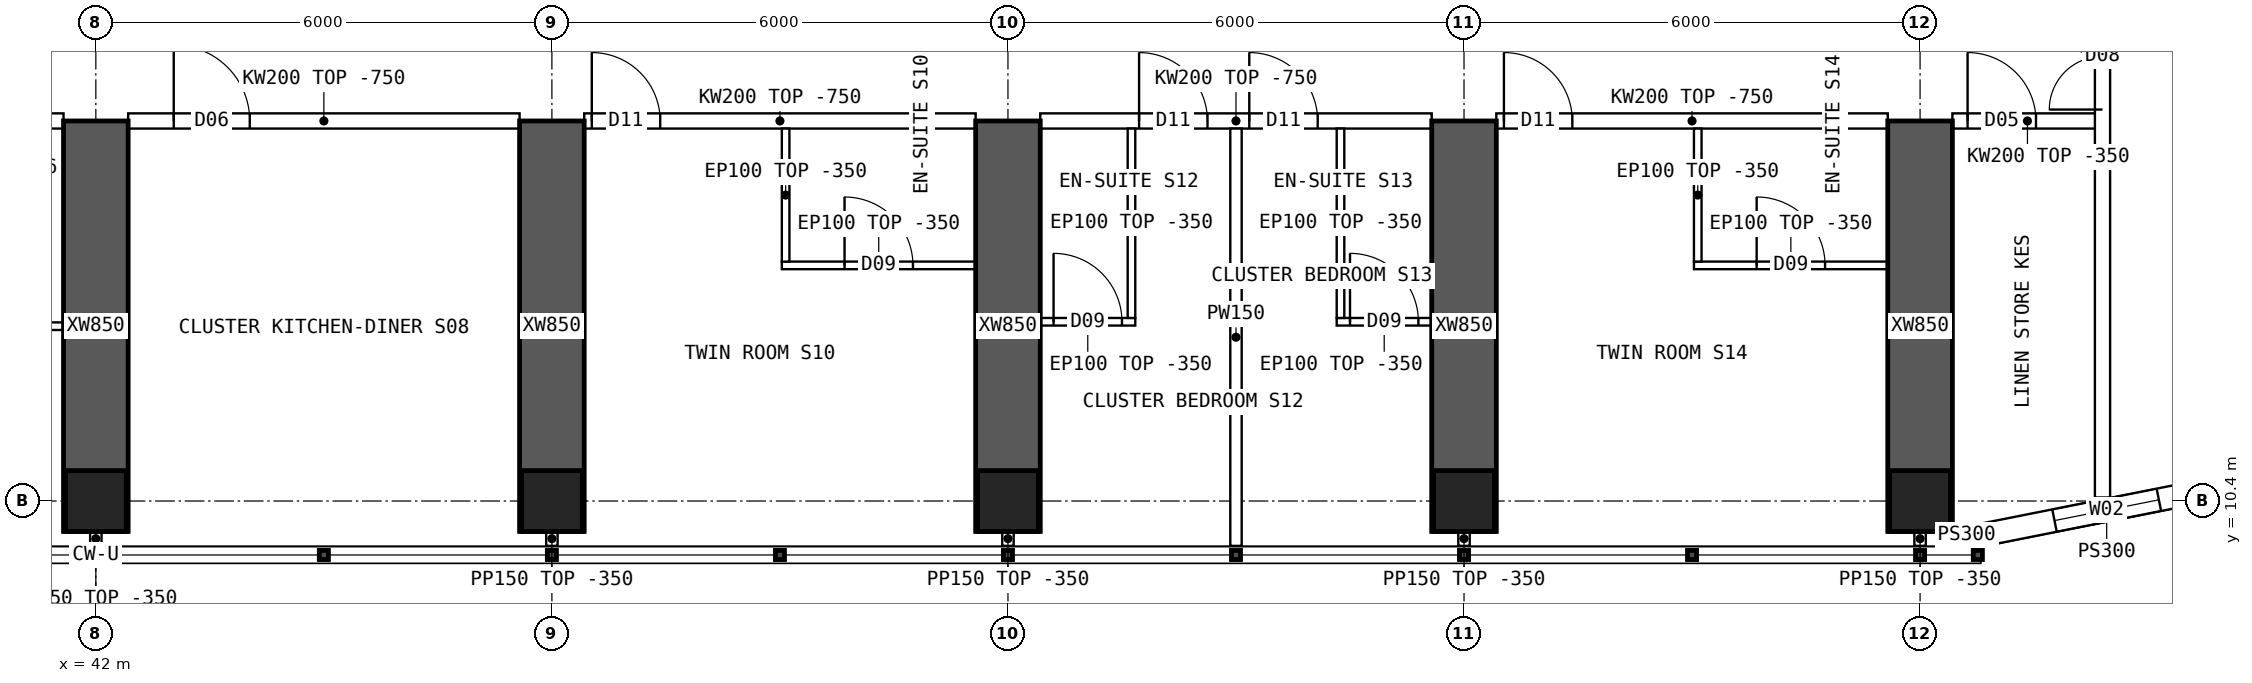
"""IFC4 building model, lengths in metres.
Left out: names, types, materials, properties, quantities, classifications, styles, units other than length and angle.
Written with IfcOpenShell. Run it as: python <this file> out.ifc"""

import sys

from ifc_helpers import new_model, si_unit, direction, frame, frame_2d, origin, origin_2d, place, context, subcontext, project, spatial, polyline, rectangle, hollow_rectangle, outline, extrude, element, fill, save


model = new_model("IFC4")
c1 = context("Model", 3, precision=1e-05, world=origin(), true_north=direction((0.0, 1.0)))
c2 = subcontext(c1, "Body", "Model", "MODEL_VIEW")
j1 = project(units=[si_unit("LENGTHUNIT", "METRE"), si_unit("PLANEANGLEUNIT", "RADIAN")], contexts=[c1])
p1 = place(None, origin())
s1 = spatial("IfcSite", under=j1, at=p1, CompositionType="ELEMENT")
p2 = place(p1, origin())
s2 = spatial("IfcBuilding", under=s1, at=p2, CompositionType="ELEMENT")
p3 = place(p2, frame((0.0, 0.0, 197.35)))
s3 = spatial("IfcBuildingStorey", under=s2, at=p3, CompositionType="ELEMENT", Elevation=197.35)
for number, where, z_axis, x_axis in (
    (1, (42.0, 10.4, 0.0), (0.0, 0.0, 1.0), (1.0, 0.0, 0.0)),
    (2, (48.0, 10.4, 0.0), (0.0, 0.0, 1.0), (1.0, 0.0, 0.0)),
    (3, (54.0, 10.4, 0.0), (0.0, 0.0, 1.0), (1.0, 0.0, 0.0)),
    (4, (60.0, 10.4, 0.0), (0.0, 0.0, 1.0), (1.0, 0.0, 0.0)),
    (5, (66.0, 10.4, 0.0), (0.0, 0.0, 1.0), (1.0, 0.0, 0.0)),
):
    element("IfcColumn", number, at=place(p3, frame(where, z_axis=z_axis, x_axis=x_axis)), inside=s3, PredefinedType="COLUMN", context=c2, shape_type="SweptSolid", body=[
        extrude(hollow_rectangle(XDim=0.8, YDim=0.8, WallThickness=0.08, at=origin_2d()), origin(), (0.0, 0.0, 1.0), 3.75),
    ])
for number, where, z_axis, x_axis in (
    (6, (42.0, 10.0, 0.0), (0.0, 0.0, 1.0), (0.0, 1.0, 0.0)),
    (7, (48.0, 10.0, 0.0), (0.0, 0.0, 1.0), (0.0, 1.0, 0.0)),
    (8, (54.0, 10.0, 0.0), (0.0, 0.0, 1.0), (0.0, 1.0, 0.0)),
    (9, (60.0, 10.0, 0.0), (0.0, 0.0, 1.0), (0.0, 1.0, 0.0)),
    (10, (66.0, 10.0, 0.0), (0.0, 0.0, 1.0), (0.0, 1.0, 0.0)),
):
    element("IfcWall", number, at=place(p3, frame(where, z_axis=z_axis, x_axis=x_axis)), inside=s3, PredefinedType="SHEAR", context=c2, shape_type="SweptSolid", body=[
        extrude(rectangle(XDim=5.4, YDim=0.85, at=frame_2d((2.7, 0.0))), origin(), (0.0, 0.0, 1.0), 3.75),
    ])
p4 = place(p3, frame((66.8, 9.95, 0.0), z_axis=(0.0, 0.0, 1.0), x_axis=(0.98078325777, 0.195100490205, 0.0)))
e11 = element("IfcWall", 11, at=p4, inside=s3, PredefinedType="SOLIDWALL", context=c2, shape_type="SweptSolid", body=[
    extrude(outline(polyline([(-0.03, -0.15), (3.405, -0.15), (3.345, 0.15), (0.03, 0.15), (-0.03, -0.15)])), origin(), (0.0, 0.0, 1.0), 3.4),
])
p5 = place(p4, frame((0.988, 0.0, 0.9)))
e12 = element("IfcOpeningElement", 12, at=p5, cuts=e11, PredefinedType="OPENING", context=c2, shape_type="SweptSolid", body=[
    extrude(rectangle(XDim=1.4, YDim=1.8, at=frame_2d((0.7, 0.9))), frame((0.0, 0.16, 0.0), z_axis=(0.0, -1.0, 0.0), x_axis=(1.0, 0.0, 0.0)), (0.0, 0.0, 1.0), 0.32),
])
p6 = place(p3, frame((66.8, 9.95, 0.0), z_axis=(0.0, 0.0, 1.0), x_axis=(-1.0, 0.0, 0.0)))
e13 = element("IfcWall", 13, at=p6, inside=s3, PredefinedType="SOLIDWALL", context=c2, shape_type="SweptSolid", body=[
    extrude(rectangle(XDim=0.375, YDim=0.3, at=frame_2d((0.188, 0.0))), origin(), (0.0, 0.0, 1.0), 3.4),
])
p7 = place(p3, frame((36.425, 15.4, 0.0), z_axis=(0.0, 0.0, 1.0), x_axis=(1.0, 0.0, 0.0)))
e14 = element("IfcWall", 14, at=p7, inside=s3, PredefinedType="SOLIDWALL", context=c2, shape_type="SweptSolid", body=[
    extrude(outline(polyline([(0.0, 0.0), (5.15, 0.0), (5.15, 3.0), (0.0, 3.0), (0.0, 0.0)])), frame((0.0, 0.1, 0.0), z_axis=(0.0, -1.0, 0.0), x_axis=(1.0, 0.0, 0.0)), (0.0, 0.0, 1.0), 0.2),
])
p8 = place(p7, frame((0.3, 0.0, 0.0)))
e15 = element("IfcOpeningElement", 15, at=p8, cuts=e14, PredefinedType="OPENING", context=c2, shape_type="SweptSolid", body=[
    extrude(rectangle(XDim=1.0, YDim=2.1, at=frame_2d((0.5, 1.05))), frame((0.0, 0.11, 0.0), z_axis=(0.0, -1.0, 0.0), x_axis=(1.0, 0.0, 0.0)), (0.0, 0.0, 1.0), 0.22),
])
p9 = place(p3, frame((42.425, 15.4, 0.0), z_axis=(0.0, 0.0, 1.0), x_axis=(1.0, 0.0, 0.0)))
e16 = element("IfcWall", 16, at=p9, inside=s3, PredefinedType="SOLIDWALL", context=c2, shape_type="SweptSolid", body=[
    extrude(outline(polyline([(0.0, 0.0), (5.15, 0.0), (5.15, 3.0), (0.0, 3.0), (0.0, 0.0)])), frame((0.0, 0.1, 0.0), z_axis=(0.0, -1.0, 0.0), x_axis=(1.0, 0.0, 0.0)), (0.0, 0.0, 1.0), 0.2),
])
p10 = place(p9, frame((0.6, 0.0, 0.0)))
e17 = element("IfcOpeningElement", 17, at=p10, cuts=e16, PredefinedType="OPENING", context=c2, shape_type="SweptSolid", body=[
    extrude(rectangle(XDim=1.0, YDim=2.1, at=frame_2d((0.5, 1.05))), frame((0.0, 0.11, 0.0), z_axis=(0.0, -1.0, 0.0), x_axis=(1.0, 0.0, 0.0)), (0.0, 0.0, 1.0), 0.22),
])
p11 = place(p3, frame((48.425, 15.4, 0.0), z_axis=(0.0, 0.0, 1.0), x_axis=(1.0, 0.0, 0.0)))
e18 = element("IfcWall", 18, at=p11, inside=s3, PredefinedType="SOLIDWALL", context=c2, shape_type="SweptSolid", body=[
    extrude(outline(polyline([(0.0, 0.0), (5.15, 0.0), (5.15, 3.0), (0.0, 3.0), (0.0, 0.0)])), frame((0.0, 0.1, 0.0), z_axis=(0.0, -1.0, 0.0), x_axis=(1.0, 0.0, 0.0)), (0.0, 0.0, 1.0), 0.2),
])
p12 = place(p11, frame((0.1, 0.0, 0.0)))
e19 = element("IfcOpeningElement", 19, at=p12, cuts=e18, PredefinedType="OPENING", context=c2, shape_type="SweptSolid", body=[
    extrude(rectangle(XDim=0.9, YDim=2.1, at=frame_2d((0.45, 1.05))), frame((0.0, 0.11, 0.0), z_axis=(0.0, -1.0, 0.0), x_axis=(1.0, 0.0, 0.0)), (0.0, 0.0, 1.0), 0.22),
])
p13 = place(p3, frame((54.425, 15.4, 0.0), z_axis=(0.0, 0.0, 1.0), x_axis=(1.0, 0.0, 0.0)))
e20 = element("IfcWall", 20, at=p13, inside=s3, PredefinedType="SOLIDWALL", context=c2, shape_type="SweptSolid", body=[
    extrude(outline(polyline([(0.0, 0.0), (5.15, 0.0), (5.15, 3.0), (0.0, 3.0), (0.0, 0.0)])), frame((0.0, 0.1, 0.0), z_axis=(0.0, -1.0, 0.0), x_axis=(1.0, 0.0, 0.0)), (0.0, 0.0, 1.0), 0.2),
])
p14 = place(p13, frame((1.3, 0.0, 0.0)))
e21 = element("IfcOpeningElement", 21, at=p14, cuts=e20, PredefinedType="OPENING", context=c2, shape_type="SweptSolid", body=[
    extrude(rectangle(XDim=0.9, YDim=2.1, at=frame_2d((0.45, 1.05))), frame((0.0, 0.11, 0.0), z_axis=(0.0, -1.0, 0.0), x_axis=(1.0, 0.0, 0.0)), (0.0, 0.0, 1.0), 0.22),
])
p15 = place(p13, frame((2.75, 0.0, 0.0)))
e22 = element("IfcOpeningElement", 22, at=p15, cuts=e20, PredefinedType="OPENING", context=c2, shape_type="SweptSolid", body=[
    extrude(rectangle(XDim=0.9, YDim=2.1, at=frame_2d((0.45, 1.05))), frame((0.0, 0.11, 0.0), z_axis=(0.0, -1.0, 0.0), x_axis=(1.0, 0.0, 0.0)), (0.0, 0.0, 1.0), 0.22),
])
p16 = place(p3, frame((60.425, 15.4, 0.0), z_axis=(0.0, 0.0, 1.0), x_axis=(1.0, 0.0, 0.0)))
e23 = element("IfcWall", 23, at=p16, inside=s3, PredefinedType="SOLIDWALL", context=c2, shape_type="SweptSolid", body=[
    extrude(outline(polyline([(0.0, 0.0), (5.15, 0.0), (5.15, 3.0), (0.0, 3.0), (0.0, 0.0)])), frame((0.0, 0.1, 0.0), z_axis=(0.0, -1.0, 0.0), x_axis=(1.0, 0.0, 0.0)), (0.0, 0.0, 1.0), 0.2),
])
p17 = place(p16, frame((0.1, 0.0, 0.0)))
e24 = element("IfcOpeningElement", 24, at=p17, cuts=e23, PredefinedType="OPENING", context=c2, shape_type="SweptSolid", body=[
    extrude(rectangle(XDim=0.9, YDim=2.1, at=frame_2d((0.45, 1.05))), frame((0.0, 0.11, 0.0), z_axis=(0.0, -1.0, 0.0), x_axis=(1.0, 0.0, 0.0)), (0.0, 0.0, 1.0), 0.22),
])
p18 = place(p3, frame((66.425, 15.4, 0.0), z_axis=(0.0, 0.0, 1.0), x_axis=(1.0, 0.0, 0.0)))
e25 = element("IfcWall", 25, at=p18, inside=s3, PredefinedType="SOLIDWALL", context=c2, shape_type="SweptSolid", body=[
    extrude(rectangle(XDim=1.975, YDim=0.2, at=frame_2d((0.987, 0.0))), origin(), (0.0, 0.0, 1.0), 3.4),
])
p19 = place(p18, frame((0.2, 0.0, 0.0)))
e26 = element("IfcOpeningElement", 26, at=p19, cuts=e25, PredefinedType="OPENING", context=c2, shape_type="SweptSolid", body=[
    extrude(rectangle(XDim=0.9, YDim=2.1, at=frame_2d((0.45, 1.05))), frame((0.0, 0.11, 0.0), z_axis=(0.0, -1.0, 0.0), x_axis=(1.0, 0.0, 0.0)), (0.0, 0.0, 1.0), 0.22),
])
p20 = place(p3, frame((38.925, 12.7, 0.0), z_axis=(0.0, 0.0, 1.0), x_axis=(1.0, 0.0, 0.0)))
e27 = element("IfcWall", 27, at=p20, inside=s3, PredefinedType="PARTITIONING", context=c2, shape_type="SweptSolid", body=[
    extrude(rectangle(XDim=2.65, YDim=0.1, at=frame_2d((1.325, 0.0))), origin(), (0.0, 0.0, 1.0), 3.4),
])
p21 = place(p3, frame((53.575, 13.5, 0.0), z_axis=(0.0, 0.0, 1.0), x_axis=(-1.0, 0.0, 0.0)))
e28 = element("IfcWall", 28, at=p21, inside=s3, PredefinedType="PARTITIONING", context=c2, shape_type="SweptSolid", body=[
    extrude(rectangle(XDim=2.55, YDim=0.1, at=frame_2d((1.275, 0.0))), origin(), (0.0, 0.0, 1.0), 3.4),
])
p22 = place(p21, frame((0.825, 0.0, 0.0)))
e29 = element("IfcOpeningElement", 29, at=p22, cuts=e28, PredefinedType="OPENING", context=c2, shape_type="SweptSolid", body=[
    extrude(rectangle(XDim=0.9, YDim=2.1, at=frame_2d((0.45, 1.05))), frame((0.0, 0.06, 0.0), z_axis=(0.0, -1.0, 0.0), x_axis=(1.0, 0.0, 0.0)), (0.0, 0.0, 1.0), 0.12),
])
p23 = place(p3, frame((51.075, 13.55, 0.0), z_axis=(0.0, 0.0, 1.0), x_axis=(0.0, 1.0, 0.0)))
e30 = element("IfcWall", 30, at=p23, inside=s3, PredefinedType="PARTITIONING", context=c2, shape_type="SweptSolid", body=[
    extrude(outline(polyline([(0.0, 0.0), (1.75, 0.0), (1.75, 3.0), (1.702, 3.0), (1.7, 3.4), (0.0, 3.4), (0.0, 0.0)])), frame((0.0, 0.05, 0.0), z_axis=(0.0, -1.0, 0.0), x_axis=(1.0, 0.0, 0.0)), (0.0, 0.0, 1.0), 0.1),
])
p24 = place(p3, frame((57.0, 9.81, 0.0), z_axis=(0.0, 0.0, 1.0), x_axis=(0.0, 1.0, 0.0)))
e31 = element("IfcWall", 31, at=p24, inside=s3, PredefinedType="PARTITIONING", context=c2, shape_type="SweptSolid", body=[
    extrude(outline(polyline([(0.0, 0.0), (5.49, 0.0), (5.49, 3.0), (5.442, 3.0), (5.44, 3.4), (0.792, 3.4), (0.79, 3.0), (0.392, 3.0), (0.39, 3.4), (0.0, 3.4), (0.0, 0.0)])), frame((0.0, 0.075, 0.0), z_axis=(0.0, -1.0, 0.0), x_axis=(1.0, 0.0, 0.0)), (0.0, 0.0, 1.0), 0.15),
])
p25 = place(p3, frame((55.675, 12.758, 0.0), z_axis=(0.0, 0.0, 1.0), x_axis=(-1.0, 0.0, 0.0)))
e32 = element("IfcWall", 32, at=p25, inside=s3, PredefinedType="PARTITIONING", context=c2, shape_type="SweptSolid", body=[
    extrude(rectangle(XDim=1.25, YDim=0.1, at=frame_2d((0.625, 0.0))), origin(), (0.0, 0.0, 1.0), 3.4),
])
p26 = place(p25, frame((0.175, 0.0, 0.0)))
e33 = element("IfcOpeningElement", 33, at=p26, cuts=e32, PredefinedType="OPENING", context=c2, shape_type="SweptSolid", body=[
    extrude(rectangle(XDim=0.9, YDim=2.1, at=frame_2d((0.45, 1.05))), frame((0.0, 0.06, 0.0), z_axis=(0.0, -1.0, 0.0), x_axis=(1.0, 0.0, 0.0)), (0.0, 0.0, 1.0), 0.12),
])
p27 = place(p3, frame((55.625, 12.808, 0.0), z_axis=(0.0, 0.0, 1.0), x_axis=(0.0, 1.0, 0.0)))
e34 = element("IfcWall", 34, at=p27, inside=s3, PredefinedType="PARTITIONING", context=c2, shape_type="SweptSolid", body=[
    extrude(outline(polyline([(0.0, 0.0), (2.492, 0.0), (2.492, 3.0), (2.444, 3.0), (2.442, 3.4), (0.0, 3.4), (0.0, 0.0)])), frame((0.0, 0.05, 0.0), z_axis=(0.0, -1.0, 0.0), x_axis=(1.0, 0.0, 0.0)), (0.0, 0.0, 1.0), 0.1),
])
p28 = place(p3, frame((59.575, 12.758, 0.0), z_axis=(0.0, 0.0, 1.0), x_axis=(-1.0, 0.0, 0.0)))
e35 = element("IfcWall", 35, at=p28, inside=s3, PredefinedType="PARTITIONING", context=c2, shape_type="SweptSolid", body=[
    extrude(rectangle(XDim=1.25, YDim=0.1, at=frame_2d((0.625, 0.0))), origin(), (0.0, 0.0, 1.0), 3.4),
])
p29 = place(p28, frame((0.175, 0.0, 0.0)))
e36 = element("IfcOpeningElement", 36, at=p29, cuts=e35, PredefinedType="OPENING", context=c2, shape_type="SweptSolid", body=[
    extrude(rectangle(XDim=0.9, YDim=2.1, at=frame_2d((0.45, 1.05))), frame((0.0, 0.06, 0.0), z_axis=(0.0, -1.0, 0.0), x_axis=(1.0, 0.0, 0.0)), (0.0, 0.0, 1.0), 0.12),
])
p30 = place(p3, frame((58.375, 12.808, 0.0), z_axis=(0.0, 0.0, 1.0), x_axis=(0.0, 1.0, 0.0)))
e37 = element("IfcWall", 37, at=p30, inside=s3, PredefinedType="PARTITIONING", context=c2, shape_type="SweptSolid", body=[
    extrude(outline(polyline([(0.0, 0.0), (2.492, 0.0), (2.492, 3.0), (2.444, 3.0), (2.442, 3.4), (0.0, 3.4), (0.0, 0.0)])), frame((0.0, 0.05, 0.0), z_axis=(0.0, -1.0, 0.0), x_axis=(1.0, 0.0, 0.0)), (0.0, 0.0, 1.0), 0.1),
])
p31 = place(p3, frame((65.575, 13.5, 0.0), z_axis=(0.0, 0.0, 1.0), x_axis=(-1.0, 0.0, 0.0)))
e38 = element("IfcWall", 38, at=p31, inside=s3, PredefinedType="PARTITIONING", context=c2, shape_type="SweptSolid", body=[
    extrude(rectangle(XDim=2.55, YDim=0.1, at=frame_2d((1.275, 0.0))), origin(), (0.0, 0.0, 1.0), 3.4),
])
p32 = place(p31, frame((0.825, 0.0, 0.0)))
e39 = element("IfcOpeningElement", 39, at=p32, cuts=e38, PredefinedType="OPENING", context=c2, shape_type="SweptSolid", body=[
    extrude(rectangle(XDim=0.9, YDim=2.1, at=frame_2d((0.45, 1.05))), frame((0.0, 0.06, 0.0), z_axis=(0.0, -1.0, 0.0), x_axis=(1.0, 0.0, 0.0)), (0.0, 0.0, 1.0), 0.12),
])
p33 = place(p3, frame((63.075, 13.55, 0.0), z_axis=(0.0, 0.0, 1.0), x_axis=(0.0, 1.0, 0.0)))
e40 = element("IfcWall", 40, at=p33, inside=s3, PredefinedType="PARTITIONING", context=c2, shape_type="SweptSolid", body=[
    extrude(outline(polyline([(0.0, 0.0), (1.75, 0.0), (1.75, 3.0), (1.702, 3.0), (1.7, 3.4), (0.0, 3.4), (0.0, 0.0)])), frame((0.0, 0.05, 0.0), z_axis=(0.0, -1.0, 0.0), x_axis=(1.0, 0.0, 0.0)), (0.0, 0.0, 1.0), 0.1),
])
p34 = place(p3, frame((68.4, 10.446, 0.0), z_axis=(0.0, 0.0, 1.0), x_axis=(0.0, 1.0, 0.0)))
e41 = element("IfcWall", 41, at=p34, inside=s3, PredefinedType="SOLIDWALL", context=c2, shape_type="SweptSolid", body=[
    extrude(rectangle(XDim=43.107, YDim=0.2, at=frame_2d((21.554, 0.0))), origin(), (0.0, 0.0, 1.0), 3.4),
])
p35 = place(p34, frame((27.994, 0.0, 0.0)))
e42 = element("IfcOpeningElement", 42, at=p35, cuts=e41, PredefinedType="OPENING", context=c2, shape_type="SweptSolid", body=[
    extrude(rectangle(XDim=1.2, YDim=2.1, at=frame_2d((0.6, 1.05))), frame((0.0, 0.11, 0.0), z_axis=(0.0, -1.0, 0.0), x_axis=(1.0, 0.0, 0.0)), (0.0, 0.0, 1.0), 0.22),
])
p36 = place(p34, frame((5.104, 0.0, 0.0)))
e43 = element("IfcOpeningElement", 43, at=p36, cuts=e41, PredefinedType="OPENING", context=c2, shape_type="SweptSolid", body=[
    extrude(rectangle(XDim=1.4, YDim=2.1, at=frame_2d((0.7, 1.05))), frame((0.0, 0.11, 0.0), z_axis=(0.0, -1.0, 0.0), x_axis=(1.0, 0.0, 0.0)), (0.0, 0.0, 1.0), 0.22),
])
p37 = place(p34, frame((36.504, 0.0, 0.0)))
e44 = element("IfcOpeningElement", 44, at=p37, cuts=e41, PredefinedType="OPENING", context=c2, shape_type="SweptSolid", body=[
    extrude(rectangle(XDim=1.4, YDim=2.1, at=frame_2d((0.7, 1.05))), frame((0.0, 0.11, 0.0), z_axis=(0.0, -1.0, 0.0), x_axis=(1.0, 0.0, 0.0)), (0.0, 0.0, 1.0), 0.22),
])
for number, where, z_axis, x_axis in (
    (45, (42.0, 10.0, 0.0), (0.0, 0.0, 1.0), (0.0, -1.0, 0.0)),
    (46, (48.0, 10.0, 0.0), (0.0, 0.0, 1.0), (0.0, -1.0, 0.0)),
    (47, (54.0, 10.0, 0.0), (0.0, 0.0, 1.0), (0.0, -1.0, 0.0)),
    (48, (60.0, 10.0, 0.0), (0.0, 0.0, 1.0), (0.0, -1.0, 0.0)),
    (49, (66.0, 10.0, 0.0), (0.0, 0.0, 1.0), (0.0, -1.0, 0.0)),
):
    element("IfcWall", number, at=place(p3, frame(where, z_axis=z_axis, x_axis=x_axis)), inside=s3, PredefinedType="PARTITIONING", context=c2, shape_type="SweptSolid", body=[
        extrude(rectangle(XDim=0.19, YDim=0.15, at=frame_2d((0.095, 0.0))), origin(), (0.0, 0.0, 1.0), 3.4),
    ])
p38 = place(p5, origin())
e50 = element("IfcWindow", 50, at=p38, inside=s3, PartitioningType="SINGLE_PANEL", PredefinedType="WINDOW", context=c2, shape_type="SweptSolid", body=[
    extrude(rectangle(XDim=1.4, YDim=1.8, at=frame_2d((0.7, 0.9))), frame((0.0, 0.03, 0.0), z_axis=(0.0, -1.0, 0.0), x_axis=(1.0, 0.0, 0.0)), (0.0, 0.0, 1.0), 0.06),
])
fill(e12, e50)
p39 = place(p10, origin())
e51 = element("IfcDoor", 51, at=p39, inside=s3, OperationType="SINGLE_SWING_LEFT", PredefinedType="DOOR", context=c2, shape_type="SweptSolid", body=[
    extrude(rectangle(XDim=1.0, YDim=2.1, at=frame_2d((0.5, 1.05))), frame((0.0, 0.025, 0.0), z_axis=(0.0, -1.0, 0.0), x_axis=(1.0, 0.0, 0.0)), (0.0, 0.0, 1.0), 0.05),
])
fill(e17, e51)
p40 = place(p22, origin())
e52 = element("IfcDoor", 52, at=p40, inside=s3, OperationType="SINGLE_SWING_RIGHT", PredefinedType="DOOR", context=c2, shape_type="SweptSolid", body=[
    extrude(rectangle(XDim=0.9, YDim=2.1, at=frame_2d((0.45, 1.05))), frame((0.0, 0.025, 0.0), z_axis=(0.0, -1.0, 0.0), x_axis=(1.0, 0.0, 0.0)), (0.0, 0.0, 1.0), 0.05),
])
fill(e29, e52)
p41 = place(p12, origin())
e53 = element("IfcDoor", 53, at=p41, inside=s3, OperationType="SINGLE_SWING_LEFT", PredefinedType="DOOR", context=c2, shape_type="SweptSolid", body=[
    extrude(rectangle(XDim=0.9, YDim=2.1, at=frame_2d((0.45, 1.05))), frame((0.0, 0.025, 0.0), z_axis=(0.0, -1.0, 0.0), x_axis=(1.0, 0.0, 0.0)), (0.0, 0.0, 1.0), 0.05),
])
fill(e19, e53)
p42 = place(p26, origin())
e54 = element("IfcDoor", 54, at=p42, inside=s3, OperationType="SINGLE_SWING_RIGHT", PredefinedType="DOOR", context=c2, shape_type="SweptSolid", body=[
    extrude(rectangle(XDim=0.9, YDim=2.1, at=frame_2d((0.45, 1.05))), frame((0.0, 0.025, 0.0), z_axis=(0.0, -1.0, 0.0), x_axis=(1.0, 0.0, 0.0)), (0.0, 0.0, 1.0), 0.05),
])
fill(e33, e54)
p43 = place(p14, origin())
e55 = element("IfcDoor", 55, at=p43, inside=s3, OperationType="SINGLE_SWING_LEFT", PredefinedType="DOOR", context=c2, shape_type="SweptSolid", body=[
    extrude(rectangle(XDim=0.9, YDim=2.1, at=frame_2d((0.45, 1.05))), frame((0.0, 0.025, 0.0), z_axis=(0.0, -1.0, 0.0), x_axis=(1.0, 0.0, 0.0)), (0.0, 0.0, 1.0), 0.05),
])
fill(e21, e55)
p44 = place(p29, origin())
e56 = element("IfcDoor", 56, at=p44, inside=s3, OperationType="SINGLE_SWING_RIGHT", PredefinedType="DOOR", context=c2, shape_type="SweptSolid", body=[
    extrude(rectangle(XDim=0.9, YDim=2.1, at=frame_2d((0.45, 1.05))), frame((0.0, 0.025, 0.0), z_axis=(0.0, -1.0, 0.0), x_axis=(1.0, 0.0, 0.0)), (0.0, 0.0, 1.0), 0.05),
])
fill(e36, e56)
p45 = place(p15, origin())
e57 = element("IfcDoor", 57, at=p45, inside=s3, OperationType="SINGLE_SWING_LEFT", PredefinedType="DOOR", context=c2, shape_type="SweptSolid", body=[
    extrude(rectangle(XDim=0.9, YDim=2.1, at=frame_2d((0.45, 1.05))), frame((0.0, 0.025, 0.0), z_axis=(0.0, -1.0, 0.0), x_axis=(1.0, 0.0, 0.0)), (0.0, 0.0, 1.0), 0.05),
])
fill(e22, e57)
p46 = place(p32, origin())
e58 = element("IfcDoor", 58, at=p46, inside=s3, OperationType="SINGLE_SWING_RIGHT", PredefinedType="DOOR", context=c2, shape_type="SweptSolid", body=[
    extrude(rectangle(XDim=0.9, YDim=2.1, at=frame_2d((0.45, 1.05))), frame((0.0, 0.025, 0.0), z_axis=(0.0, -1.0, 0.0), x_axis=(1.0, 0.0, 0.0)), (0.0, 0.0, 1.0), 0.05),
])
fill(e39, e58)
p47 = place(p17, origin())
e59 = element("IfcDoor", 59, at=p47, inside=s3, OperationType="SINGLE_SWING_LEFT", PredefinedType="DOOR", context=c2, shape_type="SweptSolid", body=[
    extrude(rectangle(XDim=0.9, YDim=2.1, at=frame_2d((0.45, 1.05))), frame((0.0, 0.025, 0.0), z_axis=(0.0, -1.0, 0.0), x_axis=(1.0, 0.0, 0.0)), (0.0, 0.0, 1.0), 0.05),
])
fill(e24, e59)
p48 = place(p36, origin())
e60 = element("IfcDoor", 60, at=p48, inside=s3, OperationType="DOUBLE_DOOR_SINGLE_SWING", PredefinedType="DOOR", context=c2, shape_type="SweptSolid", body=[
    extrude(rectangle(XDim=1.4, YDim=2.1, at=frame_2d((0.7, 1.05))), frame((0.0, 0.025, 0.0), z_axis=(0.0, -1.0, 0.0), x_axis=(1.0, 0.0, 0.0)), (0.0, 0.0, 1.0), 0.05),
])
fill(e43, e60)
p49 = place(p19, origin())
e61 = element("IfcDoor", 61, at=p49, inside=s3, OperationType="SINGLE_SWING_LEFT", PredefinedType="DOOR", context=c2, shape_type="SweptSolid", body=[
    extrude(rectangle(XDim=0.9, YDim=2.1, at=frame_2d((0.45, 1.05))), frame((0.0, 0.025, 0.0), z_axis=(0.0, -1.0, 0.0), x_axis=(1.0, 0.0, 0.0)), (0.0, 0.0, 1.0), 0.05),
])
fill(e26, e61)
save(model, sys.argv[1])
